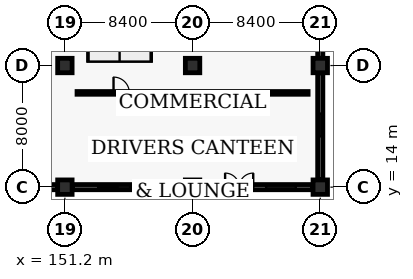
"""IFC4 building model, lengths in metres.
Left out: names, types, materials, properties, quantities, classifications, styles, units other than length and angle.
Written with IfcOpenShell. Run it as: python <this file> out.ifc"""

import sys

from ifc_helpers import new_model, si_unit, direction, frame, frame_2d, origin, origin_2d, place, context, subcontext, project, spatial, rectangle, extrude, element, fill, save


model = new_model("IFC4")
c1 = context("Model", 3, precision=1e-05, world=origin(), true_north=direction((0.0, 1.0)))
c2 = subcontext(c1, "Body", "Model", "MODEL_VIEW")
j1 = project(units=[si_unit("LENGTHUNIT", "METRE"), si_unit("PLANEANGLEUNIT", "RADIAN")], contexts=[c1])
p1 = place(None, origin())
s1 = spatial("IfcSite", under=j1, at=p1, CompositionType="ELEMENT")
p2 = place(p1, origin())
s2 = spatial("IfcBuilding", under=s1, at=p2, CompositionType="ELEMENT")
p3 = place(p2, origin())
s3 = spatial("IfcBuildingStorey", under=s2, at=p3, CompositionType="ELEMENT", Elevation=0.0)
for number, where, z_axis, x_axis in (
    (1, (151.2, 14.0, -0.46), (0.0, 0.0, 1.0), (1.0, 0.0, 0.0)),
    (2, (151.2, 22.0, -0.46), (0.0, 0.0, 1.0), (1.0, 0.0, 0.0)),
    (3, (159.6, 14.0, -0.46), (0.0, 0.0, 1.0), (1.0, 0.0, 0.0)),
    (4, (159.6, 22.0, -0.46), (0.0, 0.0, 1.0), (1.0, 0.0, 0.0)),
    (5, (168.0, 14.0, -0.46), (0.0, 0.0, 1.0), (1.0, 0.0, 0.0)),
    (6, (168.0, 22.0, -0.46), (0.0, 0.0, 1.0), (1.0, 0.0, 0.0)),
):
    element("IfcColumn", number, at=place(p3, frame(where, z_axis=z_axis, x_axis=x_axis)), inside=s3, PredefinedType="COLUMN", context=c2, shape_type="SweptSolid", body=[
        extrude(rectangle(XDim=0.95, YDim=0.95, at=origin_2d()), origin(), (0.0, 0.0, 1.0), 5.9),
    ])
p4 = place(p3, frame((143.275, 14.0, 0.0), z_axis=(0.0, 0.0, 1.0), x_axis=(1.0, 0.0, 0.0)))
e7 = element("IfcWall", 7, at=p4, inside=s3, PredefinedType="SOLIDWALL", context=c2, shape_type="SweptSolid", body=[
    extrude(rectangle(XDim=7.45, YDim=0.34, at=frame_2d((3.725, 0.0))), origin(), (0.0, 0.0, 1.0), 4.545),
])
p5 = place(p4, frame((1.665, 0.0, 0.0)))
e8 = element("IfcOpeningElement", 8, at=p5, cuts=e7, PredefinedType="OPENING", context=c2, shape_type="SweptSolid", body=[
    extrude(rectangle(XDim=1.85, YDim=2.2, at=frame_2d((0.925, 1.1))), frame((0.0, 0.18, 0.0), z_axis=(0.0, -1.0, 0.0), x_axis=(1.0, 0.0, 0.0)), (0.0, 0.0, 1.0), 0.36),
])
p6 = place(p4, frame((4.365, 0.0, 1.05)))
e9 = element("IfcOpeningElement", 9, at=p6, cuts=e7, PredefinedType="OPENING", context=c2, shape_type="SweptSolid", body=[
    extrude(rectangle(XDim=1.95, YDim=1.4, at=frame_2d((0.975, 0.7))), frame((0.0, 0.18, 0.0), z_axis=(0.0, -1.0, 0.0), x_axis=(1.0, 0.0, 0.0)), (0.0, 0.0, 1.0), 0.36),
])
p7 = place(p3, frame((151.675, 14.0, 0.0), z_axis=(0.0, 0.0, 1.0), x_axis=(1.0, 0.0, 0.0)))
e10 = element("IfcWall", 10, at=p7, inside=s3, PredefinedType="SOLIDWALL", context=c2, shape_type="SweptSolid", body=[
    extrude(rectangle(XDim=7.45, YDim=0.34, at=frame_2d((3.725, 0.0))), origin(), (0.0, 0.0, 1.0), 4.545),
])
p8 = place(p7, frame((1.715, 0.0, 0.0)))
e11 = element("IfcOpeningElement", 11, at=p8, cuts=e10, PredefinedType="OPENING", context=c2, shape_type="SweptSolid", body=[
    extrude(rectangle(XDim=4.0, YDim=4.3, at=frame_2d((2.0, 2.15))), frame((0.0, 0.18, 0.0), z_axis=(0.0, -1.0, 0.0), x_axis=(1.0, 0.0, 0.0)), (0.0, 0.0, 1.0), 0.36),
])
p9 = place(p3, frame((160.075, 14.0, 0.0), z_axis=(0.0, 0.0, 1.0), x_axis=(1.0, 0.0, 0.0)))
e12 = element("IfcWall", 12, at=p9, inside=s3, PredefinedType="SOLIDWALL", context=c2, shape_type="SweptSolid", body=[
    extrude(rectangle(XDim=7.45, YDim=0.34, at=frame_2d((3.725, 0.0))), origin(), (0.0, 0.0, 1.0), 4.545),
])
p10 = place(p9, frame((1.665, 0.0, 0.0)))
e13 = element("IfcOpeningElement", 13, at=p10, cuts=e12, PredefinedType="OPENING", context=c2, shape_type="SweptSolid", body=[
    extrude(rectangle(XDim=1.85, YDim=2.2, at=frame_2d((0.925, 1.1))), frame((0.0, 0.18, 0.0), z_axis=(0.0, -1.0, 0.0), x_axis=(1.0, 0.0, 0.0)), (0.0, 0.0, 1.0), 0.36),
])
p11 = place(p9, frame((4.365, 0.0, 1.05)))
e14 = element("IfcOpeningElement", 14, at=p11, cuts=e12, PredefinedType="OPENING", context=c2, shape_type="SweptSolid", body=[
    extrude(rectangle(XDim=1.95, YDim=1.4, at=frame_2d((0.975, 0.7))), frame((0.0, 0.18, 0.0), z_axis=(0.0, -1.0, 0.0), x_axis=(1.0, 0.0, 0.0)), (0.0, 0.0, 1.0), 0.36),
])
p12 = place(p3, frame((168.0, 14.475, 0.0), z_axis=(0.0, 0.0, 1.0), x_axis=(0.0, 1.0, 0.0)))
e15 = element("IfcWall", 15, at=p12, inside=s3, PredefinedType="SOLIDWALL", context=c2, shape_type="SweptSolid", body=[
    extrude(rectangle(XDim=7.05, YDim=0.34, at=frame_2d((3.525, 0.0))), origin(), (0.0, 0.0, 1.0), 4.545),
])
p13 = place(p12, frame((2.865, 0.0, 1.35)))
e16 = element("IfcOpeningElement", 16, at=p13, cuts=e15, PredefinedType="OPENING", context=c2, shape_type="SweptSolid", body=[
    extrude(rectangle(XDim=1.5, YDim=1.1, at=frame_2d((0.75, 0.55))), frame((0.0, 0.18, 0.0), z_axis=(0.0, -1.0, 0.0), x_axis=(1.0, 0.0, 0.0)), (0.0, 0.0, 1.0), 0.36),
])
p14 = place(p3, frame((168.0, 22.475, 0.0), z_axis=(0.0, 0.0, 1.0), x_axis=(0.0, 1.0, 0.0)))
e17 = element("IfcWall", 17, at=p14, inside=s3, PredefinedType="SOLIDWALL", context=c2, shape_type="SweptSolid", body=[
    extrude(rectangle(XDim=7.45, YDim=0.34, at=frame_2d((3.725, 0.0))), origin(), (0.0, 0.0, 1.0), 4.545),
])
p15 = place(p14, frame((2.865, 0.0, 1.35)))
e18 = element("IfcOpeningElement", 18, at=p15, cuts=e17, PredefinedType="OPENING", context=c2, shape_type="SweptSolid", body=[
    extrude(rectangle(XDim=1.5, YDim=1.1, at=frame_2d((0.75, 0.55))), frame((0.0, 0.18, 0.0), z_axis=(0.0, -1.0, 0.0), x_axis=(1.0, 0.0, 0.0)), (0.0, 0.0, 1.0), 0.36),
])
p16 = place(p3, frame((152.0, 20.2, 0.0), z_axis=(0.0, 0.0, 1.0), x_axis=(1.0, 0.0, 0.0)))
e19 = element("IfcWall", 19, at=p16, inside=s3, PredefinedType="SOLIDWALL", context=c2, shape_type="SweptSolid", body=[
    extrude(rectangle(XDim=15.2, YDim=0.18, at=frame_2d((7.6, 0.0))), origin(), (0.0, 0.0, 1.0), 3.2),
])
p17 = place(p16, frame((2.4, 0.0, 0.0)))
e20 = element("IfcOpeningElement", 20, at=p17, cuts=e19, PredefinedType="OPENING", context=c2, shape_type="SweptSolid", body=[
    extrude(rectangle(XDim=1.04, YDim=2.14, at=frame_2d((0.52, 1.07))), frame((0.0, 0.1, 0.0), z_axis=(0.0, -1.0, 0.0), x_axis=(1.0, 0.0, 0.0)), (0.0, 0.0, 1.0), 0.2),
])
p18 = place(p8, origin())
e21 = element("IfcDoor", 21, at=p18, inside=s3, OperationType="ROLLINGUP", PredefinedType="GATE", context=c2, shape_type="SweptSolid", body=[
    extrude(rectangle(XDim=4.0, YDim=4.3, at=frame_2d((2.0, 2.15))), frame((0.0, 0.025, 0.0), z_axis=(0.0, -1.0, 0.0), x_axis=(1.0, 0.0, 0.0)), (0.0, 0.0, 1.0), 0.05),
])
fill(e11, e21)
p19 = place(p10, origin())
e22 = element("IfcDoor", 22, at=p19, inside=s3, OperationType="DOUBLE_DOOR_SINGLE_SWING", PredefinedType="DOOR", context=c2, shape_type="SweptSolid", body=[
    extrude(rectangle(XDim=1.85, YDim=2.2, at=frame_2d((0.925, 1.1))), frame((0.0, 0.025, 0.0), z_axis=(0.0, -1.0, 0.0), x_axis=(1.0, 0.0, 0.0)), (0.0, 0.0, 1.0), 0.05),
])
fill(e13, e22)
p20 = place(p11, origin())
e23 = element("IfcWindow", 23, at=p20, inside=s3, PartitioningType="DOUBLE_PANEL_VERTICAL", PredefinedType="WINDOW", context=c2, shape_type="SweptSolid", body=[
    extrude(rectangle(XDim=1.95, YDim=1.4, at=frame_2d((0.975, 0.7))), frame((0.0, 0.03, 0.0), z_axis=(0.0, -1.0, 0.0), x_axis=(1.0, 0.0, 0.0)), (0.0, 0.0, 1.0), 0.06),
])
fill(e14, e23)
p21 = place(p13, origin())
e24 = element("IfcWindow", 24, at=p21, inside=s3, PartitioningType="SINGLE_PANEL", PredefinedType="WINDOW", context=c2, shape_type="SweptSolid", body=[
    extrude(rectangle(XDim=1.5, YDim=1.1, at=frame_2d((0.75, 0.55))), frame((0.0, 0.03, 0.0), z_axis=(0.0, -1.0, 0.0), x_axis=(1.0, 0.0, 0.0)), (0.0, 0.0, 1.0), 0.06),
])
fill(e16, e24)
p22 = place(p17, origin())
e25 = element("IfcDoor", 25, at=p22, inside=s3, OperationType="SINGLE_SWING_LEFT", PredefinedType="DOOR", context=c2, shape_type="SweptSolid", body=[
    extrude(rectangle(XDim=1.04, YDim=2.14, at=frame_2d((0.52, 1.07))), frame((0.0, 0.025, 0.0), z_axis=(0.0, -1.0, 0.0), x_axis=(1.0, 0.0, 0.0)), (0.0, 0.0, 1.0), 0.05),
])
fill(e20, e25)
save(model, sys.argv[1])
